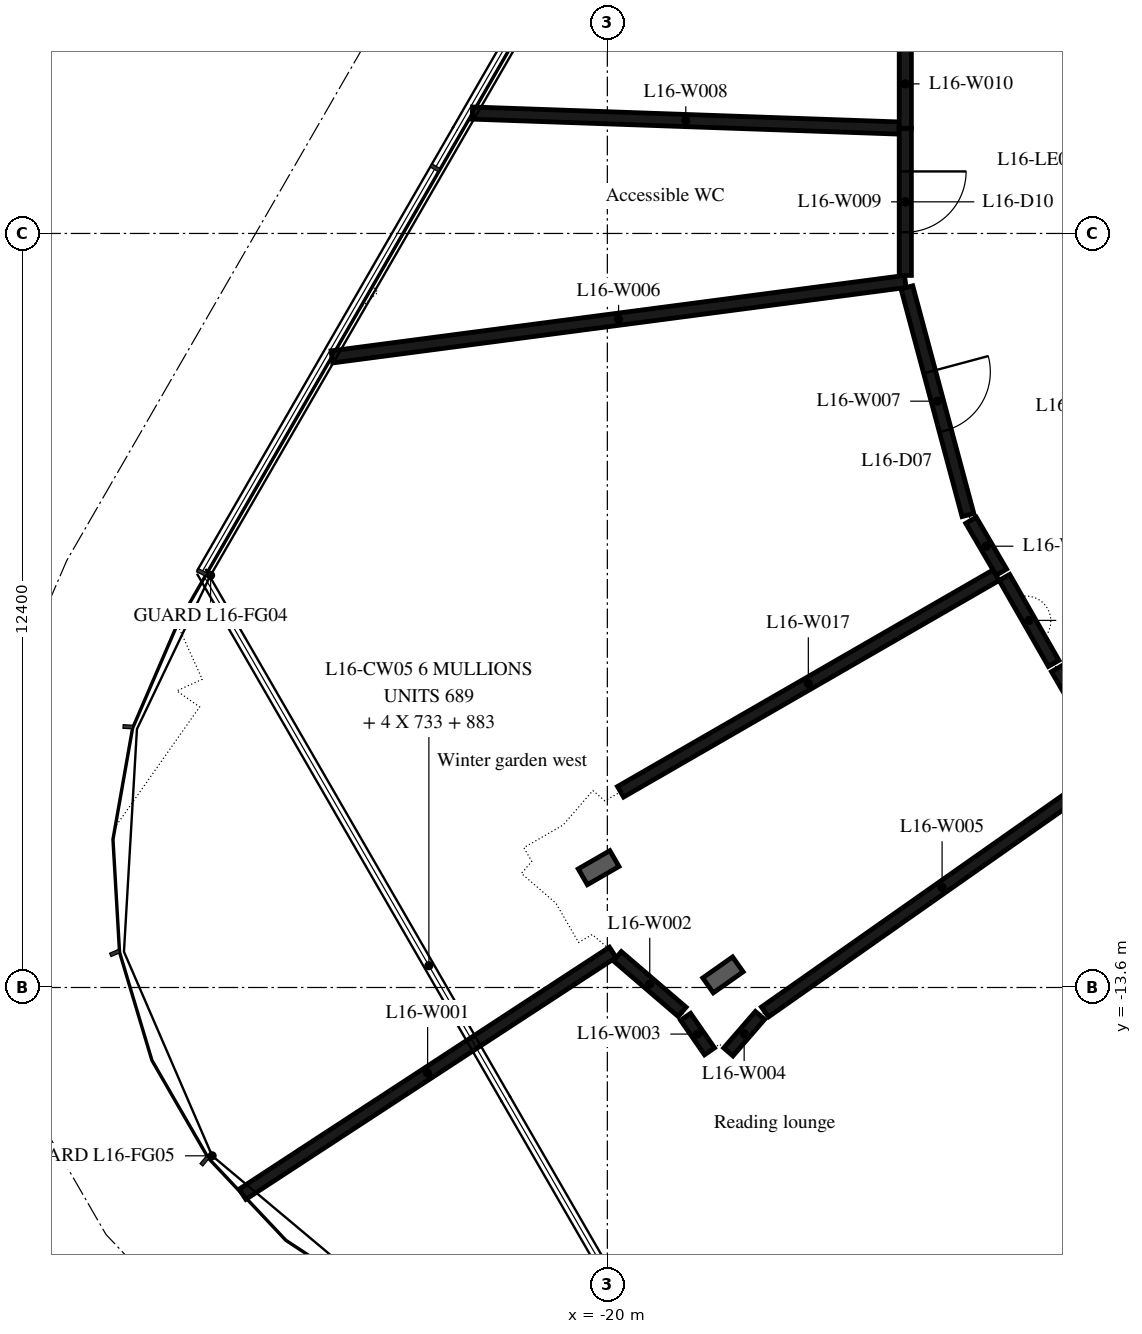
"""IFC4 building model, lengths in metres.
Left out: names, types, materials, properties, quantities, classifications, styles, units other than length and angle.
Written with IfcOpenShell. Run it as: python <this file> out.ifc"""

import sys

from ifc_helpers import new_model, si_unit, direction, frame, frame_2d, origin, place, context, subcontext, project, spatial, rectangle, extrude, element, fill, save


model = new_model("IFC4")
c1 = context("Model", 3, precision=1e-05, world=origin(), true_north=direction((0.0, 1.0)))
c2 = subcontext(c1, "Body", "Model", "MODEL_VIEW")
j1 = project(units=[si_unit("LENGTHUNIT", "METRE"), si_unit("PLANEANGLEUNIT", "RADIAN")], contexts=[c1])
p1 = place(None, origin())
s1 = spatial("IfcSite", under=j1, at=p1, CompositionType="ELEMENT")
p2 = place(p1, origin())
s2 = spatial("IfcBuilding", under=s1, at=p2, CompositionType="ELEMENT")
p3 = place(p2, frame((0.0, 0.0, 69.9)))
s3 = spatial("IfcBuildingStorey", under=s2, at=p3, CompositionType="ELEMENT", Elevation=69.9)
p4 = place(p3, frame((-19.911, -13.021, 0.0), z_axis=(0.0, 0.0, 1.0), x_axis=(-0.837091398282, -0.547063059366, 0.0)))
e1 = element("IfcWall", 1, at=p4, inside=s3, PredefinedType="PARTITIONING", context=c2, shape_type="SweptSolid", body=[
    extrude(rectangle(XDim=7.274, YDim=0.2, at=frame_2d((3.637, 0.0))), origin(), (0.0, 0.0, 1.0), 6.35),
])
p5 = place(p3, frame((-18.77, -14.0, 0.0), z_axis=(0.0, 0.0, 1.0), x_axis=(-0.758888143088, 0.651220996498, 0.0)))
e2 = element("IfcWall", 2, at=p5, inside=s3, PredefinedType="PARTITIONING", context=c2, shape_type="SweptSolid", body=[
    extrude(rectangle(XDim=1.404, YDim=0.2, at=frame_2d((0.702, 0.0))), origin(), (0.0, 0.0, 1.0), 6.35),
])
p6 = place(p3, frame((-18.713, -14.082, 0.0), z_axis=(0.0, 0.0, 1.0), x_axis=(0.569301912227, -0.822128537843, 0.0)))
e3 = element("IfcWall", 3, at=p6, inside=s3, PredefinedType="PARTITIONING", context=c2, shape_type="SweptSolid", body=[
    extrude(rectangle(XDim=0.69, YDim=0.2, at=frame_2d((0.345, 0.0))), origin(), (0.0, 0.0, 1.0), 6.35),
])
p7 = place(p3, frame((-18.01, -14.66, 0.0), z_axis=(0.0, 0.0, 1.0), x_axis=(0.655035903523, 0.755597753501, 0.0)))
e4 = element("IfcWall", 4, at=p7, inside=s3, PredefinedType="PARTITIONING", context=c2, shape_type="SweptSolid", body=[
    extrude(rectangle(XDim=0.794, YDim=0.2, at=frame_2d((0.397, 0.0))), origin(), (0.0, 0.0, 1.0), 6.35),
])
p8 = place(p3, frame((-17.408, -14.002, 0.0), z_axis=(0.0, 0.0, 1.0), x_axis=(0.818143313396, 0.575014363947, 0.0)))
e5 = element("IfcWall", 5, at=p8, inside=s3, PredefinedType="PARTITIONING", context=c2, shape_type="SweptSolid", body=[
    extrude(rectangle(XDim=7.122, YDim=0.2, at=frame_2d((3.561, 0.0))), origin(), (0.0, 0.0, 1.0), 6.35),
])
p9 = place(p3, frame((-15.1, -1.99, 0.0), z_axis=(0.0, 0.0, 1.0), x_axis=(-0.99146503856, -0.130372839634, 0.0)))
e6 = element("IfcWall", 6, at=p9, inside=s3, PredefinedType="PARTITIONING", context=c2, shape_type="SweptSolid", body=[
    extrude(rectangle(XDim=9.511, YDim=0.2, at=frame_2d((4.756, 0.0))), origin(), (0.0, 0.0, 1.0), 6.35),
])
p10 = place(p3, frame((-15.074, -2.087, 0.0), z_axis=(0.0, 0.0, 1.0), x_axis=(0.259026804199, -0.965870133458, 0.0)))
e7 = element("IfcWall", 7, at=p10, inside=s3, PredefinedType="PARTITIONING", context=c2, shape_type="SweptSolid", body=[
    extrude(rectangle(XDim=3.876, YDim=0.2, at=frame_2d((1.938, 0.0))), origin(), (0.0, 0.0, 1.0), 6.35),
])
p11 = place(p10, frame((1.438, 0.0, 0.0)))
e8 = element("IfcOpeningElement", 8, at=p11, cuts=e7, PredefinedType="OPENING", context=c2, shape_type="SweptSolid", body=[
    extrude(rectangle(XDim=1.0, YDim=2.1, at=frame_2d((0.5, 1.05))), frame((0.0, 0.11, 0.0), z_axis=(0.0, -1.0, 0.0), x_axis=(1.0, 0.0, 0.0)), (0.0, 0.0, 1.0), 0.22),
])
p12 = place(p3, frame((-15.2, 0.533, 0.0), z_axis=(0.0, 0.0, 1.0), x_axis=(-0.999383668214, 0.035103898758, 0.0)))
e9 = element("IfcWall", 9, at=p12, inside=s3, PredefinedType="PARTITIONING", context=c2, shape_type="SweptSolid", body=[
    extrude(rectangle(XDim=7.024, YDim=0.2, at=frame_2d((3.512, 0.0))), origin(), (0.0, 0.0, 1.0), 6.35),
])
p13 = place(p3, frame((-15.1, 0.53, 0.0), z_axis=(0.0, 0.0, 1.0), x_axis=(0.0, -1.0, 0.0)))
e10 = element("IfcWall", 10, at=p13, inside=s3, PredefinedType="PARTITIONING", context=c2, shape_type="SweptSolid", body=[
    extrude(rectangle(XDim=2.42, YDim=0.2, at=frame_2d((1.21, 0.0))), origin(), (0.0, 0.0, 1.0), 6.35),
])
p14 = place(p13, frame((0.71, 0.0, 0.0)))
e11 = element("IfcOpeningElement", 11, at=p14, cuts=e10, PredefinedType="OPENING", context=c2, shape_type="SweptSolid", body=[
    extrude(rectangle(XDim=1.0, YDim=2.1, at=frame_2d((0.5, 1.05))), frame((0.0, 0.11, 0.0), z_axis=(0.0, -1.0, 0.0), x_axis=(1.0, 0.0, 0.0)), (0.0, 0.0, 1.0), 0.22),
])
p15 = place(p3, frame((-15.1, 1.99, 0.0), z_axis=(0.0, 0.0, 1.0), x_axis=(0.0, -1.0, 0.0)))
e12 = element("IfcWall", 12, at=p15, inside=s3, PredefinedType="PARTITIONING", context=c2, shape_type="SweptSolid", body=[
    extrude(rectangle(XDim=1.46, YDim=0.2, at=frame_2d((0.73, 0.0))), origin(), (0.0, 0.0, 1.0), 6.35),
])
p16 = place(p3, frame((-14.02, -5.916, 0.0), z_axis=(0.0, 0.0, 1.0), x_axis=(0.504990876894, -0.863124680596, 0.0)))
e13 = element("IfcWall", 13, at=p16, inside=s3, PredefinedType="PARTITIONING", context=c2, shape_type="SweptSolid", body=[
    extrude(rectangle(XDim=0.989, YDim=0.2, at=frame_2d((0.495, 0.0))), origin(), (0.0, 0.0, 1.0), 6.35),
])
p17 = place(p3, frame((-13.607, -6.82, 0.0), z_axis=(0.0, 0.0, 1.0), x_axis=(-0.866289323715, -0.499542598401, 0.0)))
e14 = element("IfcWall", 14, at=p17, inside=s3, PredefinedType="PARTITIONING", context=c2, shape_type="SweptSolid", body=[
    extrude(rectangle(XDim=7.13, YDim=0.2, at=frame_2d((3.565, 0.0))), origin(), (0.0, 0.0, 1.0), 6.35),
])
p18 = place(p3, frame((-13.47, -6.857, 0.0), z_axis=(0.0, 0.0, 1.0), x_axis=(0.49738110484, -0.867532153034, 0.0)))
e15 = element("IfcWall", 15, at=p18, inside=s3, PredefinedType="PARTITIONING", context=c2, shape_type="SweptSolid", body=[
    extrude(rectangle(XDim=1.629, YDim=0.2, at=frame_2d((0.814, 0.0))), origin(), (0.0, 0.0, 1.0), 6.35),
])
p19 = place(p3, frame((-12.61, -8.356, 0.0), z_axis=(0.0, 0.0, 1.0), x_axis=(0.501655813699, -0.865067306388, 0.0)))
e16 = element("IfcWall", 16, at=p19, inside=s3, PredefinedType="PARTITIONING", context=c2, shape_type="SweptSolid", body=[
    extrude(rectangle(XDim=1.056, YDim=0.2, at=frame_2d((0.528, 0.0))), origin(), (0.0, 0.0, 1.0), 6.35),
])
p20 = place(p3, frame((-8.284, -12.764, 0.0), z_axis=(0.0, 0.0, 1.0), x_axis=(-0.54521987952, -0.838293077018, 0.0)))
e17 = element("IfcWall", 17, at=p20, inside=s3, PredefinedType="PARTITIONING", context=c2, shape_type="SweptSolid", body=[
    extrude(rectangle(XDim=8.19, YDim=0.2, at=frame_2d((4.095, 0.0))), origin(), (0.0, 0.0, 1.0), 6.35),
])
p21 = place(p11, origin())
e18 = element("IfcDoor", 18, at=p21, inside=s3, OperationType="SINGLE_SWING_LEFT", PredefinedType="DOOR", context=c2, shape_type="SweptSolid", body=[
    extrude(rectangle(XDim=1.0, YDim=2.1, at=frame_2d((0.5, 1.05))), frame((0.0, 0.025, 0.0), z_axis=(0.0, -1.0, 0.0), x_axis=(1.0, 0.0, 0.0)), (0.0, 0.0, 1.0), 0.05),
])
fill(e8, e18)
p22 = place(p14, origin())
e19 = element("IfcDoor", 19, at=p22, inside=s3, OperationType="SINGLE_SWING_LEFT", PredefinedType="DOOR", context=c2, shape_type="SweptSolid", body=[
    extrude(rectangle(XDim=1.0, YDim=2.1, at=frame_2d((0.5, 1.05))), frame((0.0, 0.025, 0.0), z_axis=(0.0, -1.0, 0.0), x_axis=(1.0, 0.0, 0.0)), (0.0, 0.0, 1.0), 0.05),
])
fill(e11, e19)
save(model, sys.argv[1])
